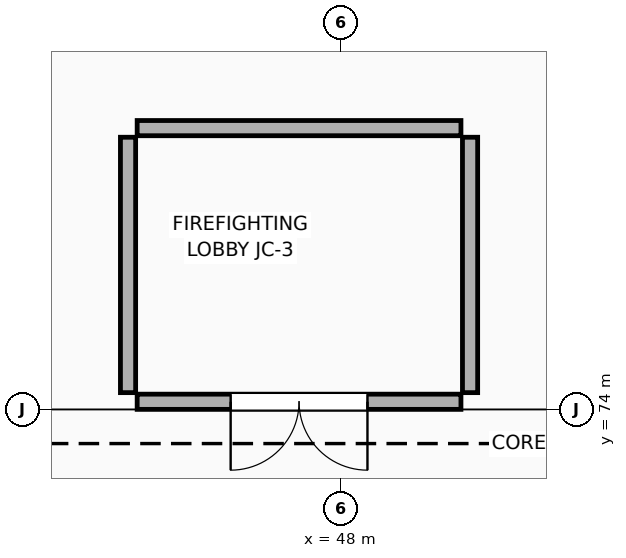
"""IFC4 building model, lengths in metres.
Left out: names, types, materials, properties, quantities, classifications, styles, units other than length and angle.
Written with IfcOpenShell. Run it as: python <this file> out.ifc"""

import sys

from ifc_helpers import new_model, si_unit, direction, frame, frame_2d, origin, place, context, subcontext, project, spatial, rectangle, extrude, element, fill, save


model = new_model("IFC4")
c1 = context("Model", 3, precision=1e-05, world=origin(), true_north=direction((0.0, 1.0)))
c2 = subcontext(c1, "Body", "Model", "MODEL_VIEW")
j1 = project(units=[si_unit("LENGTHUNIT", "METRE"), si_unit("PLANEANGLEUNIT", "RADIAN")], contexts=[c1])
p1 = place(None, origin())
s1 = spatial("IfcSite", under=j1, at=p1, CompositionType="ELEMENT")
p2 = place(p1, origin())
s2 = spatial("IfcBuilding", under=s1, at=p2, CompositionType="ELEMENT")
p3 = place(p2, frame((0.0, 0.0, 5.4)))
s3 = spatial("IfcBuildingStorey", under=s2, at=p3, CompositionType="ELEMENT", Elevation=5.4)
p4 = place(p3, frame((45.2, 74.22, 0.0), z_axis=(0.0, 0.0, 1.0), x_axis=(0.0, 1.0, 0.0)))
e1 = element("IfcWall", 1, at=p4, inside=s3, PredefinedType="PARTITIONING", context=c2, shape_type="SweptSolid", body=[
    extrude(rectangle(XDim=3.36, YDim=0.2, at=frame_2d((1.68, 0.0))), origin(), (0.0, 0.0, 1.0), 4.53),
])
p5 = place(p3, frame((45.32, 77.7, 0.0), z_axis=(0.0, 0.0, 1.0), x_axis=(1.0, 0.0, 0.0)))
e2 = element("IfcWall", 2, at=p5, inside=s3, PredefinedType="PARTITIONING", context=c2, shape_type="SweptSolid", body=[
    extrude(rectangle(XDim=4.26, YDim=0.2, at=frame_2d((2.13, 0.0))), origin(), (0.0, 0.0, 1.0), 4.53),
])
p6 = place(p3, frame((49.7, 77.58, 0.0), z_axis=(0.0, 0.0, 1.0), x_axis=(0.0, -1.0, 0.0)))
e3 = element("IfcWall", 3, at=p6, inside=s3, PredefinedType="PARTITIONING", context=c2, shape_type="SweptSolid", body=[
    extrude(rectangle(XDim=3.36, YDim=0.2, at=frame_2d((1.68, 0.0))), origin(), (0.0, 0.0, 1.0), 4.53),
])
p7 = place(p3, frame((49.58, 74.1, 0.0), z_axis=(0.0, 0.0, 1.0), x_axis=(-1.0, 0.0, 0.0)))
e4 = element("IfcWall", 4, at=p7, inside=s3, PredefinedType="PARTITIONING", context=c2, shape_type="SweptSolid", body=[
    extrude(rectangle(XDim=4.26, YDim=0.2, at=frame_2d((2.13, 0.0))), origin(), (0.0, 0.0, 1.0), 4.53),
])
p8 = place(p7, frame((1.23, 0.0, 0.0)))
e5 = element("IfcOpeningElement", 5, at=p8, cuts=e4, PredefinedType="OPENING", context=c2, shape_type="SweptSolid", body=[
    extrude(rectangle(XDim=1.8, YDim=2.15, at=frame_2d((0.9, 1.075))), frame((0.0, 0.11, 0.0), z_axis=(0.0, -1.0, 0.0), x_axis=(1.0, 0.0, 0.0)), (0.0, 0.0, 1.0), 0.22),
])
p9 = place(p8, origin())
e6 = element("IfcDoor", 6, at=p9, inside=s3, OperationType="DOUBLE_DOOR_SINGLE_SWING", PredefinedType="DOOR", context=c2, shape_type="SweptSolid", body=[
    extrude(rectangle(XDim=1.8, YDim=2.15, at=frame_2d((0.9, 1.075))), frame((0.0, 0.025, 0.0), z_axis=(0.0, -1.0, 0.0), x_axis=(1.0, 0.0, 0.0)), (0.0, 0.0, 1.0), 0.05),
])
fill(e5, e6)
save(model, sys.argv[1])
